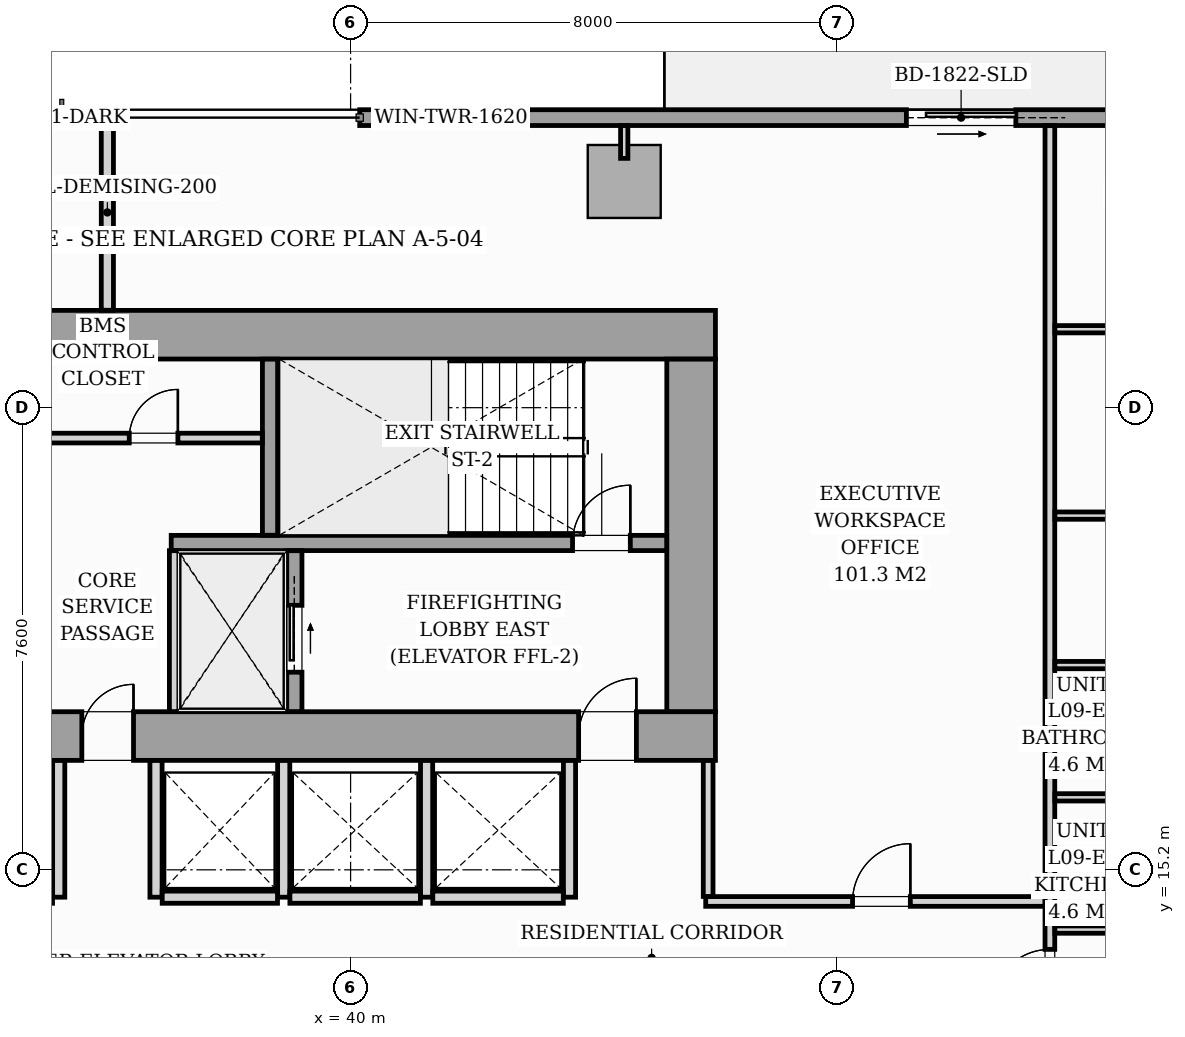
"""IFC4 building model, lengths in metres.
Left out: names, types, materials, properties, quantities, classifications, styles, units other than length and angle.
Written with IfcOpenShell. Run it as: python <this file> out.ifc"""

import sys

from ifc_helpers import new_model, si_unit, direction, frame, frame_2d, origin, origin_2d, place, context, subcontext, project, spatial, rectangle, i_section, extrude, source, transform, mapped, element, fill, save


model = new_model("IFC4")
c1 = context("Model", 3, precision=1e-05, world=origin(), true_north=direction((0.0, 1.0)))
c2 = subcontext(c1, "Body", "Model", "MODEL_VIEW")
j1 = project(units=[si_unit("LENGTHUNIT", "METRE"), si_unit("PLANEANGLEUNIT", "RADIAN")], contexts=[c1])
p1 = place(None, origin())
s1 = spatial("IfcSite", under=j1, at=p1, CompositionType="ELEMENT")
p2 = place(p1, origin())
s2 = spatial("IfcBuilding", under=s1, at=p2, CompositionType="ELEMENT")
p3 = place(p2, frame((0.0, 0.0, 35.8)))
s3 = spatial("IfcBuildingStorey", under=s2, at=p3, CompositionType="ELEMENT", Elevation=35.8)
m1 = source(origin(), c2, "Body", "SweptSolid", [
    extrude(i_section(OverallWidth=0.437, OverallDepth=0.514, WebThickness=0.061, FlangeThickness=0.097, FilletRadius=0.018, at=origin_2d()), origin(), (0.0, 0.0, 1.0), 3.196),
])
for number, where, z_axis, x_axis in (
    (1, (38.88, 17.4, 0.002), (0.0, 0.0, 1.0), (1.0, 0.0, 0.0)),
    (2, (45.6, 17.4, 0.002), (0.0, 0.0, 1.0), (1.0, 0.0, 0.0)),
    (3, (38.88, 24.0, 0.002), (0.0, 0.0, 1.0), (1.0, 0.0, 0.0)),
    (4, (45.6, 24.0, 0.002), (0.0, 0.0, 1.0), (1.0, 0.0, 0.0)),
):
    element("IfcColumn", number, at=place(p3, frame(where, z_axis=z_axis, x_axis=x_axis)), inside=s3, PredefinedType="PILASTER", context=c2, shape_type="MappedRepresentation", body=[
        mapped(m1, transform((0.0, 0.0, 0.0), scale=1.0)),
    ])
m2 = source(origin(), c2, "Body", "SweptSolid", [
    extrude(rectangle(XDim=1.2, YDim=1.2, at=origin_2d()), origin(), (0.0, 0.0, 1.0), 3.196),
])
p4 = place(p3, frame((44.5, 26.52, 0.002), z_axis=(0.0, 0.0, 1.0), x_axis=(1.0, 0.0, 0.0)))
e5 = element("IfcColumn", 5, at=p4, inside=s3, PredefinedType="COLUMN", context=c2, shape_type="MappedRepresentation", body=[
    mapped(m2, transform((0.0, 0.0, 0.0), scale=1.0)),
])
p5 = place(p3, frame((40.15, 27.57, 0.0), z_axis=(0.0, 0.0, 1.0), x_axis=(1.0, 0.0, 0.0)))
e6 = element("IfcWall", 6, at=p5, inside=s3, PredefinedType="STANDARD", context=c2, shape_type="SweptSolid", body=[
    extrude(rectangle(XDim=17.15, YDim=0.26, at=frame_2d((8.575, 0.0))), origin(), (0.0, 0.0, 1.0), 2.94),
])
p6 = place(p5, frame((8.99, 0.0, 0.0)))
e7 = element("IfcOpeningElement", 7, at=p6, cuts=e6, PredefinedType="OPENING", context=c2, shape_type="SweptSolid", body=[
    extrude(rectangle(XDim=1.8, YDim=2.06, at=frame_2d((0.9, 1.03))), frame((0.0, 0.14, 0.0), z_axis=(0.0, -1.0, 0.0), x_axis=(1.0, 0.0, 0.0)), (0.0, 0.0, 1.0), 0.28),
])
p7 = place(p5, frame((0.7, 0.0, 0.65)))
e8 = element("IfcOpeningElement", 8, at=p7, cuts=e6, PredefinedType="OPENING", context=c2, shape_type="SweptSolid", body=[
    extrude(rectangle(XDim=1.6, YDim=1.5, at=frame_2d((0.8, 0.75))), frame((0.0, 0.14, 0.0), z_axis=(0.0, -1.0, 0.0), x_axis=(1.0, 0.0, 0.0)), (0.0, 0.0, 1.0), 0.28),
])
p8 = place(p3, frame((26.0, 17.4, 0.0), z_axis=(0.0, 0.0, 1.0), x_axis=(1.0, 0.0, 0.0)))
e9 = element("IfcWall", 9, at=p8, inside=s3, PredefinedType="SHEAR", context=c2, shape_type="SweptSolid", body=[
    extrude(rectangle(XDim=20.0, YDim=0.8, at=frame_2d((10.0, 0.0))), origin(), (0.0, 0.0, 1.0), 3.2),
])
p9 = place(p8, frame((1.15, 0.0, 0.0)))
e10 = element("IfcOpeningElement", 10, at=p9, cuts=e9, PredefinedType="OPENING", context=c2, shape_type="SweptSolid", body=[
    extrude(rectangle(XDim=0.95, YDim=2.06, at=frame_2d((0.475, 1.03))), frame((0.0, 0.41, 0.0), z_axis=(0.0, -1.0, 0.0), x_axis=(1.0, 0.0, 0.0)), (0.0, 0.0, 1.0), 0.82),
])
p10 = place(p8, frame((9.58, 0.0, 0.0)))
e11 = element("IfcOpeningElement", 11, at=p10, cuts=e9, PredefinedType="OPENING", context=c2, shape_type="SweptSolid", body=[
    extrude(rectangle(XDim=0.85, YDim=2.0, at=frame_2d((0.425, 1.0))), frame((0.0, 0.41, 0.0), z_axis=(0.0, -1.0, 0.0), x_axis=(1.0, 0.0, 0.0)), (0.0, 0.0, 1.0), 0.82),
])
p11 = place(p8, frame((17.75, 0.0, 0.0)))
e12 = element("IfcOpeningElement", 12, at=p11, cuts=e9, PredefinedType="OPENING", context=c2, shape_type="SweptSolid", body=[
    extrude(rectangle(XDim=0.95, YDim=2.06, at=frame_2d((0.475, 1.03))), frame((0.0, 0.41, 0.0), z_axis=(0.0, -1.0, 0.0), x_axis=(1.0, 0.0, 0.0)), (0.0, 0.0, 1.0), 0.82),
])
p12 = place(p3, frame((26.0, 24.0, 0.0), z_axis=(0.0, 0.0, 1.0), x_axis=(1.0, 0.0, 0.0)))
e13 = element("IfcWall", 13, at=p12, inside=s3, PredefinedType="SHEAR", context=c2, shape_type="SweptSolid", body=[
    extrude(rectangle(XDim=20.0, YDim=0.8, at=frame_2d((10.0, 0.0))), origin(), (0.0, 0.0, 1.0), 3.2),
])
p13 = place(p3, frame((45.6, 17.802, 0.0), z_axis=(0.0, 0.0, 1.0), x_axis=(0.0, 1.0, 0.0)))
e14 = element("IfcWall", 14, at=p13, inside=s3, PredefinedType="SHEAR", context=c2, shape_type="SweptSolid", body=[
    extrude(rectangle(XDim=5.796, YDim=0.8, at=frame_2d((2.898, 0.0))), origin(), (0.0, 0.0, 1.0), 3.2),
])
p14 = place(p3, frame((37.05, 20.575, 0.0), z_axis=(0.0, 0.0, 1.0), x_axis=(1.0, 0.0, 0.0)))
e15 = element("IfcWall", 15, at=p14, inside=s3, PredefinedType="SOLIDWALL", context=c2, shape_type="SweptSolid", body=[
    extrude(rectangle(XDim=8.148, YDim=0.25, at=frame_2d((4.074, 0.0))), origin(), (0.0, 0.0, 1.0), 3.2),
])
p15 = place(p14, frame((6.6, 0.0, 0.0)))
e16 = element("IfcOpeningElement", 16, at=p15, cuts=e15, PredefinedType="OPENING", context=c2, shape_type="SweptSolid", body=[
    extrude(rectangle(XDim=0.95, YDim=2.06, at=frame_2d((0.475, 1.03))), frame((0.0, 0.135, 0.0), z_axis=(0.0, -1.0, 0.0), x_axis=(1.0, 0.0, 0.0)), (0.0, 0.0, 1.0), 0.27),
])
p16 = place(p3, frame((38.675, 20.702, 0.0), z_axis=(0.0, 0.0, 1.0), x_axis=(0.0, 1.0, 0.0)))
e17 = element("IfcWall", 17, at=p16, inside=s3, PredefinedType="SOLIDWALL", context=c2, shape_type="SweptSolid", body=[
    extrude(rectangle(XDim=2.896, YDim=0.25, at=frame_2d((1.448, 0.0))), origin(), (0.0, 0.0, 1.0), 3.2),
])
p17 = place(p3, frame((37.1, 17.802, 0.0), z_axis=(0.0, 0.0, 1.0), x_axis=(0.0, 1.0, 0.0)))
e18 = element("IfcWall", 18, at=p17, inside=s3, PredefinedType="PARTITIONING", context=c2, shape_type="SweptSolid", body=[
    extrude(rectangle(XDim=2.646, YDim=0.16, at=frame_2d((1.323, 0.0))), origin(), (0.0, 0.0, 1.0), 2.94),
])
p18 = place(p3, frame((39.075, 17.802, 0.0), z_axis=(0.0, 0.0, 1.0), x_axis=(0.0, 1.0, 0.0)))
e19 = element("IfcWall", 19, at=p18, inside=s3, PredefinedType="SOLIDWALL", context=c2, shape_type="SweptSolid", body=[
    extrude(rectangle(XDim=2.646, YDim=0.25, at=frame_2d((1.323, 0.0))), origin(), (0.0, 0.0, 1.0), 3.2),
])
p19 = place(p18, frame((0.648, 0.0, 0.0)))
e20 = element("IfcOpeningElement", 20, at=p19, cuts=e19, PredefinedType="OPENING", context=c2, shape_type="SweptSolid", body=[
    extrude(rectangle(XDim=1.1, YDim=2.08, at=frame_2d((0.55, 1.04))), frame((0.0, 0.135, 0.0), z_axis=(0.0, -1.0, 0.0), x_axis=(1.0, 0.0, 0.0)), (0.0, 0.0, 1.0), 0.27),
])
p20 = place(p3, frame((34.982, 22.3, 0.0), z_axis=(0.0, 0.0, 1.0), x_axis=(1.0, 0.0, 0.0)))
e21 = element("IfcWall", 21, at=p20, inside=s3, PredefinedType="PARTITIONING", context=c2, shape_type="SweptSolid", body=[
    extrude(rectangle(XDim=3.566, YDim=0.16, at=frame_2d((1.783, 0.0))), origin(), (0.0, 0.0, 1.0), 2.94),
])
p21 = place(p20, frame((1.378, 0.0, 0.0)))
e22 = element("IfcOpeningElement", 22, at=p21, cuts=e21, PredefinedType="OPENING", context=c2, shape_type="SweptSolid", body=[
    extrude(rectangle(XDim=0.8, YDim=2.05, at=frame_2d((0.4, 1.025))), frame((0.0, 0.09, 0.0), z_axis=(0.0, -1.0, 0.0), x_axis=(1.0, 0.0, 0.0)), (0.0, 0.0, 1.0), 0.18),
])
for number, where, z_axis, x_axis in (
    (23, (35.2, 14.75, 0.0), (0.0, 0.0, 1.0), (0.0, 1.0, 0.0)),
    (24, (36.8, 14.75, 0.0), (0.0, 0.0, 1.0), (0.0, 1.0, 0.0)),
    (25, (38.9, 14.75, 0.0), (0.0, 0.0, 1.0), (0.0, 1.0, 0.0)),
):
    element("IfcWall", number, at=place(p3, frame(where, z_axis=z_axis, x_axis=x_axis)), inside=s3, PredefinedType="PARTITIONING", context=c2, shape_type="SweptSolid", body=[
        extrude(rectangle(XDim=2.248, YDim=0.2, at=frame_2d((1.124, 0.0))), origin(), (0.0, 0.0, 1.0), 2.94),
    ])
p22 = place(p3, frame((36.902, 14.75, 0.0), z_axis=(0.0, 0.0, 1.0), x_axis=(1.0, 0.0, 0.0)))
e26 = element("IfcWall", 26, at=p22, inside=s3, PredefinedType="PARTITIONING", context=c2, shape_type="SweptSolid", body=[
    extrude(rectangle(XDim=1.896, YDim=0.2, at=frame_2d((0.948, 0.0))), origin(), (0.0, 0.0, 1.0), 2.94),
])
for number, where, z_axis, x_axis in (
    (27, (41.25, 14.75, 0.0), (0.0, 0.0, 1.0), (0.0, 1.0, 0.0)),
    (28, (43.6, 14.75, 0.0), (0.0, 0.0, 1.0), (0.0, 1.0, 0.0)),
):
    element("IfcWall", number, at=place(p3, frame(where, z_axis=z_axis, x_axis=x_axis)), inside=s3, PredefinedType="PARTITIONING", context=c2, shape_type="SweptSolid", body=[
        extrude(rectangle(XDim=2.248, YDim=0.2, at=frame_2d((1.124, 0.0))), origin(), (0.0, 0.0, 1.0), 2.94),
    ])
for number, where, z_axis, x_axis in (
    (29, (39.002, 14.75, 0.0), (0.0, 0.0, 1.0), (1.0, 0.0, 0.0)),
    (30, (41.352, 14.75, 0.0), (0.0, 0.0, 1.0), (1.0, 0.0, 0.0)),
):
    element("IfcWall", number, at=place(p3, frame(where, z_axis=z_axis, x_axis=x_axis)), inside=s3, PredefinedType="PARTITIONING", context=c2, shape_type="SweptSolid", body=[
        extrude(rectangle(XDim=2.146, YDim=0.2, at=frame_2d((1.073, 0.0))), origin(), (0.0, 0.0, 1.0), 2.94),
    ])
p23 = place(p3, frame((51.5, 12.572, 0.0), z_axis=(0.0, 0.0, 1.0), x_axis=(0.0, 1.0, 0.0)))
e31 = element("IfcWall", 31, at=p23, inside=s3, PredefinedType="PARTITIONING", context=c2, shape_type="SweptSolid", body=[
    extrude(rectangle(XDim=14.866, YDim=0.16, at=frame_2d((7.433, 0.0))), origin(), (0.0, 0.0, 1.0), 2.94),
])
p24 = place(p23, frame((0.37, 0.0, 0.0)))
e32 = element("IfcOpeningElement", 32, at=p24, cuts=e31, PredefinedType="OPENING", context=c2, shape_type="SweptSolid", body=[
    extrude(rectangle(XDim=0.95, YDim=2.06, at=frame_2d((0.475, 1.03))), frame((0.0, 0.09, 0.0), z_axis=(0.0, -1.0, 0.0), x_axis=(1.0, 0.0, 0.0)), (0.0, 0.0, 1.0), 0.18),
])
p25 = place(p3, frame((36.0, 24.402, 0.0), z_axis=(0.0, 0.0, 1.0), x_axis=(0.0, 1.0, 0.0)))
e33 = element("IfcWall", 33, at=p25, inside=s3, PredefinedType="PARTITIONING", context=c2, shape_type="SweptSolid", body=[
    extrude(rectangle(XDim=3.218, YDim=0.2, at=frame_2d((1.609, 0.0))), origin(), (0.0, 0.0, 1.0), 2.94),
])
p26 = place(p3, frame((51.582, 16.392, 0.0), z_axis=(0.0, 0.0, 1.0), x_axis=(1.0, 0.0, 0.0)))
e34 = element("IfcWall", 34, at=p26, inside=s3, PredefinedType="PARTITIONING", context=c2, shape_type="SweptSolid", body=[
    extrude(rectangle(XDim=2.256, YDim=0.12, at=frame_2d((1.128, 0.0))), origin(), (0.0, 0.0, 1.0), 2.045),
])
for number, where, z_axis, x_axis in (
    (35, (51.582, 14.217, 0.0), (0.0, 0.0, 1.0), (1.0, 0.0, 0.0)),
    (36, (51.582, 18.567, 0.0), (0.0, 0.0, 1.0), (1.0, 0.0, 0.0)),
):
    element("IfcWall", number, at=place(p3, frame(where, z_axis=z_axis, x_axis=x_axis)), inside=s3, PredefinedType="PARTITIONING", context=c2, shape_type="SweptSolid", body=[
        extrude(rectangle(XDim=2.256, YDim=0.12, at=frame_2d((1.128, 0.0))), origin(), (0.0, 0.0, 1.0), 2.94),
    ])
p27 = place(p3, frame((51.582, 24.09, 0.0), z_axis=(0.0, 0.0, 1.0), x_axis=(1.0, 0.0, 0.0)))
e37 = element("IfcWall", 37, at=p27, inside=s3, PredefinedType="PARTITIONING", context=c2, shape_type="SweptSolid", body=[
    extrude(rectangle(XDim=8.138, YDim=0.12, at=frame_2d((4.069, 0.0))), origin(), (0.0, 0.0, 1.0), 2.94),
])
p28 = place(p27, frame((3.653, 0.0, 0.0)))
e38 = element("IfcOpeningElement", 38, at=p28, cuts=e37, PredefinedType="OPENING", context=c2, shape_type="SweptSolid", body=[
    extrude(rectangle(XDim=0.85, YDim=2.05, at=frame_2d((0.425, 1.025))), frame((0.0, 0.07, 0.0), z_axis=(0.0, -1.0, 0.0), x_axis=(1.0, 0.0, 0.0)), (0.0, 0.0, 1.0), 0.14),
])
p29 = place(p3, frame((51.582, 21.025, 0.0), z_axis=(0.0, 0.0, 1.0), x_axis=(1.0, 0.0, 0.0)))
e39 = element("IfcWall", 39, at=p29, inside=s3, PredefinedType="PARTITIONING", context=c2, shape_type="SweptSolid", body=[
    extrude(rectangle(XDim=8.138, YDim=0.12, at=frame_2d((4.069, 0.0))), origin(), (0.0, 0.0, 1.0), 2.94),
])
p30 = place(p29, frame((3.653, 0.0, 0.0)))
e40 = element("IfcOpeningElement", 40, at=p30, cuts=e39, PredefinedType="OPENING", context=c2, shape_type="SweptSolid", body=[
    extrude(rectangle(XDim=0.85, YDim=2.05, at=frame_2d((0.425, 1.025))), frame((0.0, 0.07, 0.0), z_axis=(0.0, -1.0, 0.0), x_axis=(1.0, 0.0, 0.0)), (0.0, 0.0, 1.0), 0.14),
])
p31 = place(p3, frame((45.84, 14.68, 0.0), z_axis=(0.0, 0.0, 1.0), x_axis=(1.0, 0.0, 0.0)))
e41 = element("IfcWall", 41, at=p31, inside=s3, PredefinedType="PARTITIONING", context=c2, shape_type="SweptSolid", body=[
    extrude(rectangle(XDim=5.578, YDim=0.16, at=frame_2d((2.789, 0.0))), origin(), (0.0, 0.0, 1.0), 2.94),
])
p32 = place(p31, frame((2.415, 0.0, 0.0)))
e42 = element("IfcOpeningElement", 42, at=p32, cuts=e41, PredefinedType="OPENING", context=c2, shape_type="SweptSolid", body=[
    extrude(rectangle(XDim=0.95, YDim=2.06, at=frame_2d((0.475, 1.03))), frame((0.0, 0.09, 0.0), z_axis=(0.0, -1.0, 0.0), x_axis=(1.0, 0.0, 0.0)), (0.0, 0.0, 1.0), 0.18),
])
p33 = place(p3, frame((45.88, 14.762, 0.0), z_axis=(0.0, 0.0, 1.0), x_axis=(0.0, 1.0, 0.0)))
e43 = element("IfcWall", 43, at=p33, inside=s3, PredefinedType="PARTITIONING", context=c2, shape_type="SweptSolid", body=[
    extrude(rectangle(XDim=2.236, YDim=0.16, at=frame_2d((1.118, 0.0))), origin(), (0.0, 0.0, 1.0), 2.94),
])
p34 = place(p3, frame((44.5, 26.9, 0.0), z_axis=(0.0, 0.0, 1.0), x_axis=(0.0, 1.0, 0.0)))
e44 = element("IfcWall", 44, at=p34, inside=s3, PredefinedType="PARTITIONING", context=c2, shape_type="SweptSolid", body=[
    extrude(rectangle(XDim=0.538, YDim=0.12, at=frame_2d((0.269, 0.0))), origin(), (0.0, 0.0, 1.0), 2.94),
])
m3 = source(origin(), c2, "Body", "SweptSolid", [
    extrude(rectangle(XDim=1.8, YDim=2.06, at=frame_2d((0.9, 1.03))), frame((0.0, 0.025, 0.0), z_axis=(0.0, -1.0, 0.0), x_axis=(1.0, 0.0, 0.0)), (0.0, 0.0, 1.0), 0.05),
])
p35 = place(p6, origin())
e45 = element("IfcDoor", 45, at=p35, inside=s3, OperationType="SLIDING_TO_RIGHT", PredefinedType="DOOR", context=c2, shape_type="MappedRepresentation", body=[
    mapped(m3, transform((0.0, 0.0, 0.0), scale=1.0)),
])
fill(e7, e45)
m4 = source(origin(), c2, "Body", "SweptSolid", [
    extrude(rectangle(XDim=1.6, YDim=1.5, at=frame_2d((0.8, 0.75))), frame((0.0, 0.03, 0.0), z_axis=(0.0, -1.0, 0.0), x_axis=(1.0, 0.0, 0.0)), (0.0, 0.0, 1.0), 0.06),
])
p36 = place(p7, origin())
e46 = element("IfcWindow", 46, at=p36, inside=s3, PartitioningType="SINGLE_PANEL", PredefinedType="WINDOW", context=c2, shape_type="MappedRepresentation", body=[
    mapped(m4, transform((0.0, 0.0, 0.0), scale=1.0)),
])
fill(e8, e46)
m5 = source(origin(), c2, "Body", "SweptSolid", [
    extrude(rectangle(XDim=0.85, YDim=2.0, at=frame_2d((0.425, 1.0))), frame((0.0, 0.025, 0.0), z_axis=(0.0, -1.0, 0.0), x_axis=(1.0, 0.0, 0.0)), (0.0, 0.0, 1.0), 0.05),
])
p37 = place(p10, origin())
e47 = element("IfcDoor", 47, at=p37, inside=s3, OperationType="SINGLE_SWING_RIGHT", PredefinedType="DOOR", context=c2, shape_type="MappedRepresentation", body=[
    mapped(m5, transform((0.0, 0.0, 0.0), scale=1.0)),
])
fill(e11, e47)
m6 = source(origin(), c2, "Body", "SweptSolid", [
    extrude(rectangle(XDim=0.95, YDim=2.06, at=frame_2d((0.475, 1.03))), frame((0.0, 0.025, 0.0), z_axis=(0.0, -1.0, 0.0), x_axis=(1.0, 0.0, 0.0)), (0.0, 0.0, 1.0), 0.05),
])
p38 = place(p11, origin())
e48 = element("IfcDoor", 48, at=p38, inside=s3, OperationType="SINGLE_SWING_RIGHT", PredefinedType="DOOR", context=c2, shape_type="MappedRepresentation", body=[
    mapped(m6, transform((0.0, 0.0, 0.0), scale=1.0)),
])
fill(e12, e48)
p39 = place(p15, origin())
e49 = element("IfcDoor", 49, at=p39, inside=s3, OperationType="SINGLE_SWING_RIGHT", PredefinedType="DOOR", context=c2, shape_type="MappedRepresentation", body=[
    mapped(m6, transform((0.0, 0.0, 0.0), scale=1.0)),
])
fill(e16, e49)
m7 = source(origin(), c2, "Body", "SweptSolid", [
    extrude(rectangle(XDim=1.1, YDim=2.08, at=frame_2d((0.55, 1.04))), frame((0.0, 0.025, 0.0), z_axis=(0.0, -1.0, 0.0), x_axis=(1.0, 0.0, 0.0)), (0.0, 0.0, 1.0), 0.05),
])
p40 = place(p19, origin())
e50 = element("IfcDoor", 50, at=p40, inside=s3, OperationType="SLIDING_TO_RIGHT", PredefinedType="DOOR", context=c2, shape_type="MappedRepresentation", body=[
    mapped(m7, transform((0.0, 0.0, 0.0), scale=1.0)),
])
fill(e20, e50)
m8 = source(origin(), c2, "Body", "SweptSolid", [
    extrude(rectangle(XDim=0.8, YDim=2.05, at=frame_2d((0.4, 1.025))), frame((0.0, 0.025, 0.0), z_axis=(0.0, -1.0, 0.0), x_axis=(1.0, 0.0, 0.0)), (0.0, 0.0, 1.0), 0.05),
])
p41 = place(p21, origin())
e51 = element("IfcDoor", 51, at=p41, inside=s3, OperationType="SINGLE_SWING_RIGHT", PredefinedType="DOOR", context=c2, shape_type="MappedRepresentation", body=[
    mapped(m8, transform((0.0, 0.0, 0.0), scale=1.0)),
])
fill(e22, e51)
m9 = source(origin(), c2, "Body", "SweptSolid", [
    extrude(rectangle(XDim=0.95, YDim=2.06, at=frame_2d((0.475, 1.03))), frame((0.0, 0.025, 0.0), z_axis=(0.0, -1.0, 0.0), x_axis=(1.0, 0.0, 0.0)), (0.0, 0.0, 1.0), 0.05),
])
p42 = place(p24, origin())
e52 = element("IfcDoor", 52, at=p42, inside=s3, OperationType="SINGLE_SWING_LEFT", PredefinedType="DOOR", context=c2, shape_type="MappedRepresentation", body=[
    mapped(m9, transform((0.0, 0.0, 0.0), scale=1.0)),
])
fill(e32, e52)
p43 = place(p32, origin())
e53 = element("IfcDoor", 53, at=p43, inside=s3, OperationType="SINGLE_SWING_RIGHT", PredefinedType="DOOR", context=c2, shape_type="MappedRepresentation", body=[
    mapped(m9, transform((0.0, 0.0, 0.0), scale=1.0)),
])
fill(e42, e53)
save(model, sys.argv[1])
